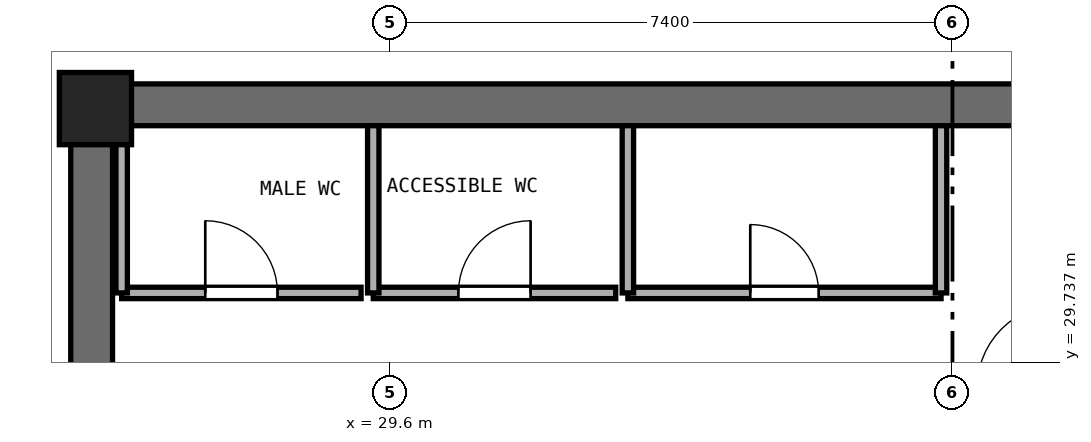
"""IFC4 building model, lengths in metres.
Left out: names, types, materials, properties, quantities, classifications, styles, units other than length and angle.
Written with IfcOpenShell. Run it as: python <this file> out.ifc"""

import sys

from ifc_helpers import new_model, si_unit, direction, frame, frame_2d, origin, origin_2d, place, context, subcontext, project, spatial, rectangle, extrude, element, fill, save


model = new_model("IFC4")
c1 = context("Model", 3, precision=1e-05, world=origin(), true_north=direction((0.0, 1.0)))
c2 = subcontext(c1, "Body", "Model", "MODEL_VIEW")
j1 = project(units=[si_unit("LENGTHUNIT", "METRE"), si_unit("PLANEANGLEUNIT", "RADIAN")], contexts=[c1])
p1 = place(None, origin())
s1 = spatial("IfcSite", under=j1, at=p1, CompositionType="ELEMENT")
p2 = place(p1, origin())
s2 = spatial("IfcBuilding", under=s1, at=p2, CompositionType="ELEMENT")
p3 = place(p2, frame((0.0, 0.0, 178.2)))
s3 = spatial("IfcBuildingStorey", under=s2, at=p3, CompositionType="ELEMENT", Elevation=178.2)
p4 = place(p3, frame((25.4, 33.125, 0.0), z_axis=(0.0, 0.0, 1.0), x_axis=(1.0, 0.0, 0.0)))
e1 = element("IfcWall", 1, at=p4, inside=s3, PredefinedType="SHEAR", context=c2, shape_type="SweptSolid", body=[
    extrude(rectangle(XDim=23.2, YDim=0.55, at=frame_2d((11.6, 0.0))), origin(), (0.0, 0.0, 1.0), 3.54),
])
p5 = place(p3, frame((25.675, 17.55, 0.0), z_axis=(0.0, 0.0, 1.0), x_axis=(0.0, 1.0, 0.0)))
e2 = element("IfcWall", 2, at=p5, inside=s3, PredefinedType="SHEAR", context=c2, shape_type="SweptSolid", body=[
    extrude(rectangle(XDim=15.3, YDim=0.55, at=frame_2d((7.65, 0.0))), origin(), (0.0, 0.0, 1.0), 3.54),
])
p6 = place(p5, frame((6.9, 0.0, 0.0)))
e3 = element("IfcOpeningElement", 3, at=p6, cuts=e2, PredefinedType="OPENING", context=c2, shape_type="SweptSolid", body=[
    extrude(rectangle(XDim=1.5, YDim=2.15, at=frame_2d((0.75, 1.075))), frame((0.0, 0.285, 0.0), z_axis=(0.0, -1.0, 0.0), x_axis=(1.0, 0.0, 0.0)), (0.0, 0.0, 1.0), 0.57),
])
p7 = place(p3, frame((25.725, 33.075, 0.0), z_axis=(0.0, 0.0, 1.0), x_axis=(1.0, 0.0, 0.0)))
e4 = element("IfcColumn", 4, at=p7, inside=s3, PredefinedType="PILASTER", context=c2, shape_type="SweptSolid", body=[
    extrude(rectangle(XDim=0.95, YDim=0.95, at=origin_2d()), origin(), (0.0, 0.0, 1.0), 3.8),
])
p8 = place(p3, frame((26.07, 30.65, 0.0), z_axis=(0.0, 0.0, 1.0), x_axis=(1.0, 0.0, 0.0)))
e5 = element("IfcWall", 5, at=p8, inside=s3, PredefinedType="PARTITIONING", context=c2, shape_type="SweptSolid", body=[
    extrude(rectangle(XDim=3.15, YDim=0.15, at=frame_2d((1.575, 0.0))), origin(), (0.0, 0.0, 1.0), 3.54),
])
p9 = place(p8, frame((1.1, 0.0, 0.0)))
e6 = element("IfcOpeningElement", 6, at=p9, cuts=e5, PredefinedType="OPENING", context=c2, shape_type="SweptSolid", body=[
    extrude(rectangle(XDim=0.95, YDim=2.1, at=frame_2d((0.475, 1.05))), frame((0.0, 0.085, 0.0), z_axis=(0.0, -1.0, 0.0), x_axis=(1.0, 0.0, 0.0)), (0.0, 0.0, 1.0), 0.17),
])
p10 = place(p3, frame((26.07, 30.65, 0.0), z_axis=(0.0, 0.0, 1.0), x_axis=(0.0, 1.0, 0.0)))
e7 = element("IfcWall", 7, at=p10, inside=s3, PredefinedType="PARTITIONING", context=c2, shape_type="SweptSolid", body=[
    extrude(rectangle(XDim=2.2, YDim=0.15, at=frame_2d((1.1, 0.0))), origin(), (0.0, 0.0, 1.0), 2.64),
])
p11 = place(p3, frame((29.38, 30.65, 0.0), z_axis=(0.0, 0.0, 1.0), x_axis=(1.0, 0.0, 0.0)))
e8 = element("IfcWall", 8, at=p11, inside=s3, PredefinedType="PARTITIONING", context=c2, shape_type="SweptSolid", body=[
    extrude(rectangle(XDim=3.19, YDim=0.15, at=frame_2d((1.595, 0.0))), origin(), (0.0, 0.0, 1.0), 3.54),
])
p12 = place(p11, frame((1.12, 0.0, 0.0)))
e9 = element("IfcOpeningElement", 9, at=p12, cuts=e8, PredefinedType="OPENING", context=c2, shape_type="SweptSolid", body=[
    extrude(rectangle(XDim=0.95, YDim=2.1, at=frame_2d((0.475, 1.05))), frame((0.0, 0.085, 0.0), z_axis=(0.0, -1.0, 0.0), x_axis=(1.0, 0.0, 0.0)), (0.0, 0.0, 1.0), 0.17),
])
p13 = place(p3, frame((29.38, 30.65, 0.0), z_axis=(0.0, 0.0, 1.0), x_axis=(0.0, 1.0, 0.0)))
e10 = element("IfcWall", 10, at=p13, inside=s3, PredefinedType="PARTITIONING", context=c2, shape_type="SweptSolid", body=[
    extrude(rectangle(XDim=2.2, YDim=0.15, at=frame_2d((1.1, 0.0))), origin(), (0.0, 0.0, 1.0), 3.54),
])
p14 = place(p3, frame((32.73, 30.65, 0.0), z_axis=(0.0, 0.0, 1.0), x_axis=(1.0, 0.0, 0.0)))
e11 = element("IfcWall", 11, at=p14, inside=s3, PredefinedType="PARTITIONING", context=c2, shape_type="SweptSolid", body=[
    extrude(rectangle(XDim=4.12, YDim=0.15, at=frame_2d((2.06, 0.0))), origin(), (0.0, 0.0, 1.0), 3.54),
])
p15 = place(p14, frame((1.61, 0.0, 0.0)))
e12 = element("IfcOpeningElement", 12, at=p15, cuts=e11, PredefinedType="OPENING", context=c2, shape_type="SweptSolid", body=[
    extrude(rectangle(XDim=0.9, YDim=2.1, at=frame_2d((0.45, 1.05))), frame((0.0, 0.085, 0.0), z_axis=(0.0, -1.0, 0.0), x_axis=(1.0, 0.0, 0.0)), (0.0, 0.0, 1.0), 0.17),
])
for number, where, z_axis, x_axis in (
    (13, (32.73, 30.65, 0.0), (0.0, 0.0, 1.0), (0.0, 1.0, 0.0)),
    (14, (36.85, 30.65, 0.0), (0.0, 0.0, 1.0), (0.0, 1.0, 0.0)),
):
    element("IfcWall", number, at=place(p3, frame(where, z_axis=z_axis, x_axis=x_axis)), inside=s3, PredefinedType="PARTITIONING", context=c2, shape_type="SweptSolid", body=[
        extrude(rectangle(XDim=2.2, YDim=0.15, at=frame_2d((1.1, 0.0))), origin(), (0.0, 0.0, 1.0), 3.54),
    ])
p16 = place(p9, origin())
e15 = element("IfcDoor", 15, at=p16, inside=s3, OperationType="SINGLE_SWING_LEFT", PredefinedType="DOOR", context=c2, shape_type="SweptSolid", body=[
    extrude(rectangle(XDim=0.95, YDim=2.1, at=frame_2d((0.475, 1.05))), frame((0.0, 0.025, 0.0), z_axis=(0.0, -1.0, 0.0), x_axis=(1.0, 0.0, 0.0)), (0.0, 0.0, 1.0), 0.05),
])
fill(e6, e15)
p17 = place(p12, origin())
e16 = element("IfcDoor", 16, at=p17, inside=s3, OperationType="SINGLE_SWING_RIGHT", PredefinedType="DOOR", context=c2, shape_type="SweptSolid", body=[
    extrude(rectangle(XDim=0.95, YDim=2.1, at=frame_2d((0.475, 1.05))), frame((0.0, 0.025, 0.0), z_axis=(0.0, -1.0, 0.0), x_axis=(1.0, 0.0, 0.0)), (0.0, 0.0, 1.0), 0.05),
])
fill(e9, e16)
p18 = place(p15, origin())
e17 = element("IfcDoor", 17, at=p18, inside=s3, OperationType="SINGLE_SWING_LEFT", PredefinedType="DOOR", context=c2, shape_type="SweptSolid", body=[
    extrude(rectangle(XDim=0.9, YDim=2.1, at=frame_2d((0.45, 1.05))), frame((0.0, 0.025, 0.0), z_axis=(0.0, -1.0, 0.0), x_axis=(1.0, 0.0, 0.0)), (0.0, 0.0, 1.0), 0.05),
])
fill(e12, e17)
save(model, sys.argv[1])
